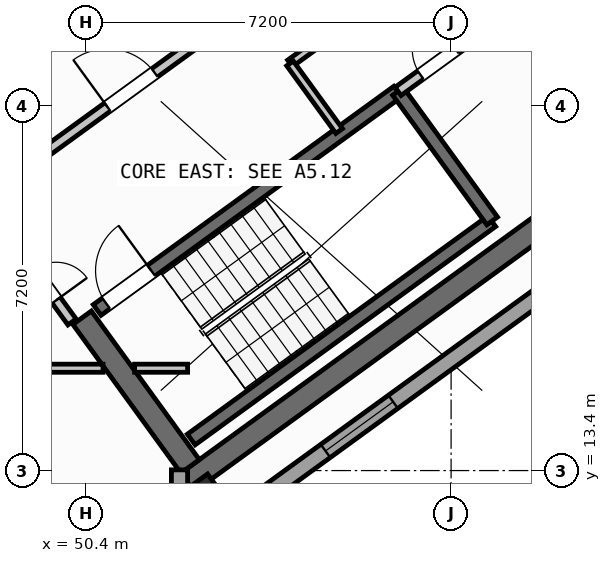
"""IFC4 building model, lengths in metres.
Left out: names, types, materials, properties, quantities, classifications, styles, units other than length and angle.
Written with IfcOpenShell. Run it as: python <this file> out.ifc"""

import sys

from ifc_helpers import new_model, si_unit, direction, frame, frame_2d, origin, origin_2d, place, context, subcontext, project, spatial, rectangle, hollow_rectangle, extrude, source, transform, mapped, element, fill, save


model = new_model("IFC4")
c1 = context("Model", 3, precision=1e-05, world=origin(), true_north=direction((0.0, 1.0)))
c2 = subcontext(c1, "Body", "Model", "MODEL_VIEW")
j1 = project(units=[si_unit("LENGTHUNIT", "METRE"), si_unit("PLANEANGLEUNIT", "RADIAN")], contexts=[c1])
p1 = place(None, origin())
s1 = spatial("IfcSite", under=j1, at=p1, CompositionType="ELEMENT")
p2 = place(p1, origin())
s2 = spatial("IfcBuilding", under=s1, at=p2, CompositionType="ELEMENT")
p3 = place(p2, frame((0.0, 0.0, 225.6)))
s3 = spatial("IfcBuildingStorey", under=s2, at=p3, CompositionType="ELEMENT", Elevation=225.6)
p4 = place(p3, frame((52.399, 13.169, 0.0), z_axis=(0.0, 0.0, 1.0), x_axis=(0.809022352778, 0.587777877013, 0.0)))
e1 = element("IfcWall", 1, at=p4, inside=s3, PredefinedType="SHEAR", context=c2, shape_type="SweptSolid", body=[
    extrude(rectangle(XDim=12.24, YDim=0.45, at=frame_2d((6.12, 0.0))), origin(), (0.0, 0.0, 1.0), 3.35),
])
p5 = place(p3, frame((52.449, 13.483, 0.0), z_axis=(0.0, 0.0, 1.0), x_axis=(-0.587819244441, 0.808992296542, 0.0)))
e2 = element("IfcWall", 2, at=p5, inside=s3, PredefinedType="SHEAR", context=c2, shape_type="SweptSolid", body=[
    extrude(rectangle(XDim=3.625, YDim=0.45, at=frame_2d((1.812, 0.0))), origin(), (0.0, 0.0, 1.0), 3.35),
])
m1 = source(origin(), c2, "Body", "SweptSolid", [
    extrude(hollow_rectangle(XDim=0.8, YDim=0.8, WallThickness=0.032, at=origin_2d()), origin(), (0.0, 0.0, 1.0), 3.6),
])
p6 = place(p3, frame((52.705, 12.773, 0.0), z_axis=(0.0, 0.0, 1.0), x_axis=(0.809016994375, 0.587785252292, 0.0)))
e3 = element("IfcColumn", 3, at=p6, inside=s3, PredefinedType="COLUMN", context=c2, shape_type="MappedRepresentation", body=[
    mapped(m1, transform((0.0, 0.0, 0.0), scale=1.0)),
])
p7 = place(p3, frame((67.454, 22.747, 0.0), z_axis=(0.0, 0.0, 1.0), x_axis=(-0.809021120468, -0.587779573171, 0.0)))
e4 = element("IfcWall", 4, at=p7, inside=s3, PredefinedType="STANDARD", context=c2, shape_type="SweptSolid", body=[
    extrude(rectangle(XDim=17.588, YDim=0.32, at=frame_2d((8.794, 0.0))), origin(), (0.0, 0.0, 1.0), 3.35),
])
p8 = place(p7, frame((1.624, 0.0, 0.0)))
e5 = element("IfcOpeningElement", 5, at=p8, cuts=e4, PredefinedType="OPENING", context=c2, shape_type="SweptSolid", body=[
    extrude(rectangle(XDim=1.05, YDim=2.15, at=frame_2d((0.525, 1.075))), frame((0.0, 0.17, 0.0), z_axis=(0.0, -1.0, 0.0), x_axis=(1.0, 0.0, 0.0)), (0.0, 0.0, 1.0), 0.34),
])
p9 = place(p7, frame((8.344, 0.0, 0.9)))
e6 = element("IfcOpeningElement", 6, at=p9, cuts=e4, PredefinedType="OPENING", context=c2, shape_type="SweptSolid", body=[
    extrude(rectangle(XDim=1.65, YDim=1.45, at=frame_2d((0.825, 0.725))), frame((0.0, 0.17, 0.0), z_axis=(0.0, -1.0, 0.0), x_axis=(1.0, 0.0, 0.0)), (0.0, 0.0, 1.0), 0.34),
])
p10 = place(p7, frame((13.594, 0.0, 0.9)))
e7 = element("IfcOpeningElement", 7, at=p10, cuts=e4, PredefinedType="OPENING", context=c2, shape_type="SweptSolid", body=[
    extrude(rectangle(XDim=1.65, YDim=1.45, at=frame_2d((0.825, 0.725))), frame((0.0, 0.17, 0.0), z_axis=(0.0, -1.0, 0.0), x_axis=(1.0, 0.0, 0.0)), (0.0, 0.0, 1.0), 0.34),
])
p11 = place(p3, frame((52.24, 13.414, 0.0), z_axis=(0.0, 0.0, 1.0), x_axis=(0.0, -1.0, 0.0)))
e8 = element("IfcWall", 8, at=p11, inside=s3, PredefinedType="STANDARD", context=c2, shape_type="SweptSolid", body=[
    extrude(rectangle(XDim=9.948, YDim=0.32, at=frame_2d((4.974, 0.0))), origin(), (0.0, 0.0, 1.0), 3.35),
])
p12 = place(p11, frame((2.521, 0.0, 0.9)))
e9 = element("IfcOpeningElement", 9, at=p12, cuts=e8, PredefinedType="OPENING", context=c2, shape_type="SweptSolid", body=[
    extrude(rectangle(XDim=1.65, YDim=1.45, at=frame_2d((0.825, 0.725))), frame((0.0, 0.17, 0.0), z_axis=(0.0, -1.0, 0.0), x_axis=(1.0, 0.0, 0.0)), (0.0, 0.0, 1.0), 0.34),
])
p13 = place(p11, frame((7.258, 0.0, 0.9)))
e10 = element("IfcOpeningElement", 10, at=p13, cuts=e8, PredefinedType="OPENING", context=c2, shape_type="SweptSolid", body=[
    extrude(rectangle(XDim=1.35, YDim=1.45, at=frame_2d((0.675, 0.725))), frame((0.0, 0.17, 0.0), z_axis=(0.0, -1.0, 0.0), x_axis=(1.0, 0.0, 0.0)), (0.0, 0.0, 1.0), 0.34),
])
p14 = place(p3, frame((52.472, 14.013, 0.0), z_axis=(0.0, 0.0, 1.0), x_axis=(0.809028366311, 0.587769599847, 0.0)))
e11 = element("IfcWall", 11, at=p14, inside=s3, PredefinedType="SHEAR", context=c2, shape_type="SweptSolid", body=[
    extrude(rectangle(XDim=7.33, YDim=0.26, at=frame_2d((3.665, 0.0))), origin(), (0.0, 0.0, 1.0), 3.35),
])
p15 = place(p3, frame((50.615, 16.57, 0.0), z_axis=(0.0, 0.0, 1.0), x_axis=(0.809028366311, 0.587769599847, 0.0)))
e12 = element("IfcWall", 12, at=p15, inside=s3, PredefinedType="SHEAR", context=c2, shape_type="SweptSolid", body=[
    extrude(rectangle(XDim=7.33, YDim=0.26, at=frame_2d((3.665, 0.0))), origin(), (0.0, 0.0, 1.0), 3.35),
])
p16 = place(p15, frame((0.22, 0.0, 0.0)))
e13 = element("IfcOpeningElement", 13, at=p16, cuts=e12, PredefinedType="OPENING", context=c2, shape_type="SweptSolid", body=[
    extrude(rectangle(XDim=1.1, YDim=2.1, at=frame_2d((0.55, 1.05))), frame((0.0, 0.14, 0.0), z_axis=(0.0, -1.0, 0.0), x_axis=(1.0, 0.0, 0.0)), (0.0, 0.0, 1.0), 0.28),
])
p17 = place(p3, frame((58.41, 18.327, 0.0), z_axis=(0.0, 0.0, 1.0), x_axis=(-0.58776738483, 0.809029975545, 0.0)))
e14 = element("IfcWall", 14, at=p17, inside=s3, PredefinedType="SHEAR", context=c2, shape_type="SweptSolid", body=[
    extrude(rectangle(XDim=3.16, YDim=0.26, at=frame_2d((1.58, 0.0))), origin(), (0.0, 0.0, 1.0), 3.35),
])
p18 = place(p3, frame((47.025, 21.378, 0.0), z_axis=(0.0, 0.0, 1.0), x_axis=(0.809052869724, 0.587735870941, 0.0)))
e15 = element("IfcWall", 15, at=p18, inside=s3, PredefinedType="STANDARD", context=c2, shape_type="SweptSolid", body=[
    extrude(rectangle(XDim=3.498, YDim=0.2, at=frame_2d((1.749, 0.0))), origin(), (0.0, 0.0, 1.0), 3.34),
])
p19 = place(p18, frame((0.508, 0.0, 0.0)))
e16 = element("IfcOpeningElement", 16, at=p19, cuts=e15, PredefinedType="OPENING", context=c2, shape_type="SweptSolid", body=[
    extrude(rectangle(XDim=1.3, YDim=2.2, at=frame_2d((0.65, 1.1))), frame((0.0, 0.11, 0.0), z_axis=(0.0, -1.0, 0.0), x_axis=(1.0, 0.0, 0.0)), (0.0, 0.0, 1.0), 0.22),
])
p20 = place(p3, frame((48.718, 19.048, 0.0), z_axis=(0.0, 0.0, 1.0), x_axis=(0.809017261719, 0.587784884325, 0.0)))
e17 = element("IfcWall", 17, at=p20, inside=s3, PredefinedType="STANDARD", context=c2, shape_type="SweptSolid", body=[
    extrude(rectangle(XDim=5.818, YDim=0.2, at=frame_2d((2.909, 0.0))), origin(), (0.0, 0.0, 1.0), 3.34),
])
p21 = place(p20, frame((2.598, 0.0, 0.0)))
e18 = element("IfcOpeningElement", 18, at=p21, cuts=e17, PredefinedType="OPENING", context=c2, shape_type="SweptSolid", body=[
    extrude(rectangle(XDim=1.15, YDim=2.1, at=frame_2d((0.575, 1.05))), frame((0.0, 0.11, 0.0), z_axis=(0.0, -1.0, 0.0), x_axis=(1.0, 0.0, 0.0)), (0.0, 0.0, 1.0), 0.22),
])
p22 = place(p3, frame((56.553, 20.884, 0.0), z_axis=(0.0, 0.0, 1.0), x_axis=(0.809041669066, 0.587751288995, 0.0)))
e19 = element("IfcWall", 19, at=p22, inside=s3, PredefinedType="STANDARD", context=c2, shape_type="SweptSolid", body=[
    extrude(rectangle(XDim=3.868, YDim=0.2, at=frame_2d((1.934, 0.0))), origin(), (0.0, 0.0, 1.0), 3.34),
])
p23 = place(p22, frame((0.55, 0.0, 0.0)))
e20 = element("IfcOpeningElement", 20, at=p23, cuts=e19, PredefinedType="OPENING", context=c2, shape_type="SweptSolid", body=[
    extrude(rectangle(XDim=0.86, YDim=2.05, at=frame_2d((0.43, 1.025))), frame((0.0, 0.11, 0.0), z_axis=(0.0, -1.0, 0.0), x_axis=(1.0, 0.0, 0.0)), (0.0, 0.0, 1.0), 0.22),
])
p24 = place(p3, frame((54.421, 21.436, 0.0), z_axis=(0.0, 0.0, 1.0), x_axis=(0.809013710463, 0.587789772183, 0.0)))
e21 = element("IfcWall", 21, at=p24, inside=s3, PredefinedType="PARTITIONING", context=c2, shape_type="SweptSolid", body=[
    extrude(rectangle(XDim=5.36, YDim=0.16, at=frame_2d((2.68, 0.0))), origin(), (0.0, 0.0, 1.0), 3.34),
])
p25 = place(p24, frame((1.4, 0.0, 0.0)))
e22 = element("IfcOpeningElement", 22, at=p25, cuts=e21, PredefinedType="OPENING", context=c2, shape_type="SweptSolid", body=[
    extrude(rectangle(XDim=0.86, YDim=2.05, at=frame_2d((0.43, 1.025))), frame((0.0, 0.09, 0.0), z_axis=(0.0, -1.0, 0.0), x_axis=(1.0, 0.0, 0.0)), (0.0, 0.0, 1.0), 0.18),
])
p26 = place(p3, frame((55.391, 20.102, 0.0), z_axis=(0.0, 0.0, 1.0), x_axis=(-0.58778447739, 0.809017557374, 0.0)))
e23 = element("IfcWall", 23, at=p26, inside=s3, PredefinedType="PARTITIONING", context=c2, shape_type="SweptSolid", body=[
    extrude(rectangle(XDim=1.65, YDim=0.16, at=frame_2d((0.825, 0.0))), origin(), (0.0, 0.0, 1.0), 3.34),
])
p27 = place(p3, frame((35.178, 15.42, 0.0), z_axis=(0.0, 0.0, 1.0), x_axis=(1.0, 0.0, 0.0)))
e24 = element("IfcWall", 24, at=p27, inside=s3, PredefinedType="PARTITIONING", context=c2, shape_type="SweptSolid", body=[
    extrude(rectangle(XDim=15.552, YDim=0.16, at=frame_2d((7.776, 0.0))), origin(), (0.0, 0.0, 1.0), 3.34),
])
p28 = place(p27, frame((1.028, 0.0, 0.0)))
e25 = element("IfcOpeningElement", 25, at=p28, cuts=e24, PredefinedType="OPENING", context=c2, shape_type="SweptSolid", body=[
    extrude(rectangle(XDim=1.0, YDim=2.1, at=frame_2d((0.5, 1.05))), frame((0.0, 0.09, 0.0), z_axis=(0.0, -1.0, 0.0), x_axis=(1.0, 0.0, 0.0)), (0.0, 0.0, 1.0), 0.18),
])
p29 = place(p27, frame((8.858, 0.0, 0.0)))
e26 = element("IfcOpeningElement", 26, at=p29, cuts=e24, PredefinedType="OPENING", context=c2, shape_type="SweptSolid", body=[
    extrude(rectangle(XDim=1.0, YDim=2.1, at=frame_2d((0.5, 1.05))), frame((0.0, 0.09, 0.0), z_axis=(0.0, -1.0, 0.0), x_axis=(1.0, 0.0, 0.0)), (0.0, 0.0, 1.0), 0.18),
])
p30 = place(p3, frame((51.354, 15.42, 0.0), z_axis=(0.0, 0.0, 1.0), x_axis=(1.0, 0.0, 0.0)))
e27 = element("IfcWall", 27, at=p30, inside=s3, PredefinedType="PARTITIONING", context=c2, shape_type="SweptSolid", body=[
    extrude(rectangle(XDim=1.046, YDim=0.16, at=frame_2d((0.523, 0.0))), origin(), (0.0, 0.0, 1.0), 3.34),
])
p31 = place(p3, frame((50.119, 16.333, 0.0), z_axis=(0.0, 0.0, 1.0), x_axis=(-0.587749856981, 0.809042709391, 0.0)))
e28 = element("IfcWall", 28, at=p31, inside=s3, PredefinedType="STANDARD", context=c2, shape_type="SweptSolid", body=[
    extrude(rectangle(XDim=2.96, YDim=0.2, at=frame_2d((1.48, 0.0))), origin(), (0.0, 0.0, 1.0), 3.34),
])
p32 = place(p31, frame((0.53, 0.0, 0.0)))
e29 = element("IfcOpeningElement", 29, at=p32, cuts=e28, PredefinedType="OPENING", context=c2, shape_type="SweptSolid", body=[
    extrude(rectangle(XDim=1.5, YDim=2.15, at=frame_2d((0.75, 1.075))), frame((0.0, 0.11, 0.0), z_axis=(0.0, -1.0, 0.0), x_axis=(1.0, 0.0, 0.0)), (0.0, 0.0, 1.0), 0.22),
])
m2 = source(origin(), c2, "Body", "SweptSolid", [
    extrude(rectangle(XDim=1.65, YDim=1.45, at=frame_2d((0.825, 0.725))), frame((0.0, 0.03, 0.0), z_axis=(0.0, -1.0, 0.0), x_axis=(1.0, 0.0, 0.0)), (0.0, 0.0, 1.0), 0.06),
])
p33 = place(p10, origin())
e30 = element("IfcWindow", 30, at=p33, inside=s3, PartitioningType="SINGLE_PANEL", PredefinedType="WINDOW", context=c2, shape_type="MappedRepresentation", body=[
    mapped(m2, transform((0.0, 0.0, 0.0), scale=1.0)),
])
fill(e7, e30)
m3 = source(origin(), c2, "Body", "SweptSolid", [
    extrude(rectangle(XDim=1.1, YDim=2.1, at=frame_2d((0.55, 1.05))), frame((0.0, 0.025, 0.0), z_axis=(0.0, -1.0, 0.0), x_axis=(1.0, 0.0, 0.0)), (0.0, 0.0, 1.0), 0.05),
])
p34 = place(p16, origin())
e31 = element("IfcDoor", 31, at=p34, inside=s3, OperationType="SINGLE_SWING_RIGHT", PredefinedType="DOOR", context=c2, shape_type="MappedRepresentation", body=[
    mapped(m3, transform((0.0, 0.0, 0.0), scale=1.0)),
])
fill(e13, e31)
m4 = source(origin(), c2, "Body", "SweptSolid", [
    extrude(rectangle(XDim=1.15, YDim=2.1, at=frame_2d((0.575, 1.05))), frame((0.0, 0.025, 0.0), z_axis=(0.0, -1.0, 0.0), x_axis=(1.0, 0.0, 0.0)), (0.0, 0.0, 1.0), 0.05),
])
p35 = place(p21, origin())
e32 = element("IfcDoor", 32, at=p35, inside=s3, OperationType="SINGLE_SWING_LEFT", PredefinedType="DOOR", context=c2, shape_type="MappedRepresentation", body=[
    mapped(m4, transform((0.0, 0.0, 0.0), scale=1.0)),
])
fill(e18, e32)
m5 = source(origin(), c2, "Body", "SweptSolid", [
    extrude(rectangle(XDim=0.86, YDim=2.05, at=frame_2d((0.43, 1.025))), frame((0.0, 0.025, 0.0), z_axis=(0.0, -1.0, 0.0), x_axis=(1.0, 0.0, 0.0)), (0.0, 0.0, 1.0), 0.05),
])
p36 = place(p23, origin())
e33 = element("IfcDoor", 33, at=p36, inside=s3, OperationType="SINGLE_SWING_RIGHT", PredefinedType="DOOR", context=c2, shape_type="MappedRepresentation", body=[
    mapped(m5, transform((0.0, 0.0, 0.0), scale=1.0)),
])
fill(e20, e33)
m6 = source(origin(), c2, "Body", "SweptSolid", [
    extrude(rectangle(XDim=1.5, YDim=2.15, at=frame_2d((0.75, 1.075))), frame((0.0, 0.025, 0.0), z_axis=(0.0, -1.0, 0.0), x_axis=(1.0, 0.0, 0.0)), (0.0, 0.0, 1.0), 0.05),
])
p37 = place(p32, frame((1.5, 0.0, 0.0), z_axis=(0.0, 0.0, 1.0), x_axis=(-1.0, 0.0, 0.0)))
e34 = element("IfcDoor", 34, at=p37, inside=s3, OperationType="DOUBLE_DOOR_SINGLE_SWING", PredefinedType="DOOR", context=c2, shape_type="MappedRepresentation", body=[
    mapped(m6, transform((0.0, 0.0, 0.0), scale=1.0)),
])
fill(e29, e34)
save(model, sys.argv[1])
